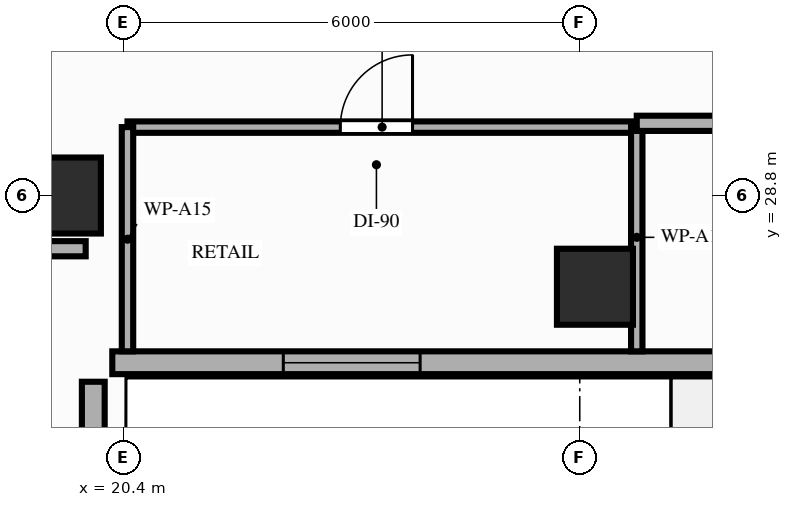
"""IFC4 building model, lengths in metres.
Left out: names, types, materials, properties, quantities, classifications, styles, units other than length and angle.
Written with IfcOpenShell. Run it as: python <this file> out.ifc"""

import sys

from ifc_helpers import new_model, si_unit, direction, frame, frame_2d, origin, origin_2d, place, context, subcontext, project, spatial, rectangle, extrude, element, fill, save


model = new_model("IFC4")
c1 = context("Model", 3, precision=1e-05, world=origin(), true_north=direction((0.0, 1.0)))
c2 = subcontext(c1, "Body", "Model", "MODEL_VIEW")
j1 = project(units=[si_unit("LENGTHUNIT", "METRE"), si_unit("PLANEANGLEUNIT", "RADIAN")], contexts=[c1])
p1 = place(None, origin())
s1 = spatial("IfcSite", under=j1, at=p1, CompositionType="ELEMENT")
p2 = place(p1, origin())
s2 = spatial("IfcBuilding", under=s1, at=p2, CompositionType="ELEMENT")
p3 = place(p2, frame((0.0, 0.0, 117.0)))
s3 = spatial("IfcBuildingStorey", under=s2, at=p3, CompositionType="ELEMENT", Elevation=117.0)
for number, where, z_axis, x_axis in (
    (1, (19.6, 28.8, 0.0), (0.0, 0.0, 1.0), (1.0, 0.0, 0.0)),
    (2, (26.6, 27.6, 0.0), (0.0, 0.0, 1.0), (1.0, 0.0, 0.0)),
):
    element("IfcColumn", number, at=place(p3, frame(where, z_axis=z_axis, x_axis=x_axis)), inside=s3, PredefinedType="COLUMN", context=c2, shape_type="SweptSolid", body=[
        extrude(rectangle(XDim=1.0, YDim=1.0, at=origin_2d()), origin(), (0.0, 0.0, 1.0), 3.2),
    ])
p4 = place(p3, frame((20.0, 8.8, 0.0), z_axis=(0.0, 0.0, 1.0), x_axis=(0.0, 1.0, 0.0)))
e3 = element("IfcWall", 3, at=p4, inside=s3, PredefinedType="STANDARD", context=c2, shape_type="SweptSolid", body=[
    extrude(rectangle(XDim=17.55, YDim=0.3, at=frame_2d((8.775, 0.0))), origin(), (0.0, 0.0, 1.0), 2.41),
])
p5 = place(p4, frame((12.04, 0.0, 0.85)))
e4 = element("IfcOpeningElement", 4, at=p5, cuts=e3, PredefinedType="OPENING", context=c2, shape_type="SweptSolid", body=[
    extrude(rectangle(XDim=1.8, YDim=1.31, at=frame_2d((0.9, 0.655))), frame((0.0, 0.16, 0.0), z_axis=(0.0, -1.0, 0.0), x_axis=(1.0, 0.0, 0.0)), (0.0, 0.0, 1.0), 0.32),
])
p6 = place(p4, frame((5.6, 0.0, 0.85)))
e5 = element("IfcOpeningElement", 5, at=p6, cuts=e3, PredefinedType="OPENING", context=c2, shape_type="SweptSolid", body=[
    extrude(rectangle(XDim=1.8, YDim=1.31, at=frame_2d((0.9, 0.655))), frame((0.0, 0.16, 0.0), z_axis=(0.0, -1.0, 0.0), x_axis=(1.0, 0.0, 0.0)), (0.0, 0.0, 1.0), 0.32),
])
p7 = place(p3, frame((20.25, 26.6, 0.0), z_axis=(0.0, 0.0, 1.0), x_axis=(1.0, 0.0, 0.0)))
e6 = element("IfcWall", 6, at=p7, inside=s3, PredefinedType="STANDARD", context=c2, shape_type="SweptSolid", body=[
    extrude(rectangle(XDim=26.15, YDim=0.3, at=frame_2d((13.075, 0.0))), origin(), (0.0, 0.0, 1.0), 2.7),
])
p8 = place(p7, frame((8.0, 0.0, 0.0)))
e7 = element("IfcOpeningElement", 7, at=p8, cuts=e6, PredefinedType="OPENING", context=c2, shape_type="SweptSolid", body=[
    extrude(rectangle(XDim=1.3, YDim=2.08, at=frame_2d((0.65, 1.04))), frame((0.0, 0.16, 0.0), z_axis=(0.0, -1.0, 0.0), x_axis=(1.0, 0.0, 0.0)), (0.0, 0.0, 1.0), 0.32),
])
p9 = place(p7, frame((22.5, 0.0, 0.0)))
e8 = element("IfcOpeningElement", 8, at=p9, cuts=e6, PredefinedType="OPENING", context=c2, shape_type="SweptSolid", body=[
    extrude(rectangle(XDim=1.3, YDim=2.08, at=frame_2d((0.65, 1.04))), frame((0.0, 0.16, 0.0), z_axis=(0.0, -1.0, 0.0), x_axis=(1.0, 0.0, 0.0)), (0.0, 0.0, 1.0), 0.32),
])
p10 = place(p7, frame((2.25, 0.0, 0.85)))
e9 = element("IfcOpeningElement", 9, at=p10, cuts=e6, PredefinedType="OPENING", context=c2, shape_type="SweptSolid", body=[
    extrude(rectangle(XDim=1.8, YDim=1.6, at=frame_2d((0.9, 0.8))), frame((0.0, 0.16, 0.0), z_axis=(0.0, -1.0, 0.0), x_axis=(1.0, 0.0, 0.0)), (0.0, 0.0, 1.0), 0.32),
])
p11 = place(p3, frame((11.01, 28.1, 0.0), z_axis=(0.0, 0.0, 1.0), x_axis=(1.0, 0.0, 0.0)))
e10 = element("IfcWall", 10, at=p11, inside=s3, PredefinedType="PARTITIONING", context=c2, shape_type="SweptSolid", body=[
    extrude(rectangle(XDim=8.89, YDim=0.2, at=frame_2d((4.445, 0.0))), origin(), (0.0, 0.0, 1.0), 2.41),
])
p12 = place(p3, frame((20.45, 29.7, 0.0), z_axis=(0.0, 0.0, 1.0), x_axis=(1.0, 0.0, 0.0)))
e11 = element("IfcWall", 11, at=p12, inside=s3, PredefinedType="PARTITIONING", context=c2, shape_type="SweptSolid", body=[
    extrude(rectangle(XDim=6.7, YDim=0.15, at=frame_2d((3.35, 0.0))), origin(), (0.0, 0.0, 1.0), 3.02),
])
p13 = place(p12, frame((2.8, 0.0, 0.0)))
e12 = element("IfcOpeningElement", 12, at=p13, cuts=e11, PredefinedType="OPENING", context=c2, shape_type="SweptSolid", body=[
    extrude(rectangle(XDim=0.95, YDim=2.15, at=frame_2d((0.475, 1.075))), frame((0.0, 0.085, 0.0), z_axis=(0.0, -1.0, 0.0), x_axis=(1.0, 0.0, 0.0)), (0.0, 0.0, 1.0), 0.17),
])
p14 = place(p3, frame((20.45, 26.75, 0.0), z_axis=(0.0, 0.0, 1.0), x_axis=(0.0, 1.0, 0.0)))
e13 = element("IfcWall", 13, at=p14, inside=s3, PredefinedType="PARTITIONING", context=c2, shape_type="SweptSolid", body=[
    extrude(rectangle(XDim=2.95, YDim=0.15, at=frame_2d((1.475, 0.0))), origin(), (0.0, 0.0, 1.0), 2.41),
])
p15 = place(p3, frame((27.15, 26.75, 0.0), z_axis=(0.0, 0.0, 1.0), x_axis=(0.0, 1.0, 0.0)))
e14 = element("IfcWall", 14, at=p15, inside=s3, PredefinedType="PARTITIONING", context=c2, shape_type="SweptSolid", body=[
    extrude(rectangle(XDim=3.0, YDim=0.15, at=frame_2d((1.5, 0.0))), origin(), (0.0, 0.0, 1.0), 2.41),
])
p16 = place(p3, frame((27.15, 29.75, 0.0), z_axis=(0.0, 0.0, 1.0), x_axis=(1.0, 0.0, 0.0)))
e15 = element("IfcWall", 15, at=p16, inside=s3, PredefinedType="PARTITIONING", context=c2, shape_type="SweptSolid", body=[
    extrude(rectangle(XDim=13.15, YDim=0.2, at=frame_2d((6.575, 0.0))), origin(), (0.0, 0.0, 1.0), 2.41),
])
p17 = place(p16, frame((3.66, 0.0, 0.0)))
e16 = element("IfcOpeningElement", 16, at=p17, cuts=e15, PredefinedType="OPENING", context=c2, shape_type="SweptSolid", body=[
    extrude(rectangle(XDim=0.95, YDim=2.15, at=frame_2d((0.475, 1.075))), frame((0.0, 0.11, 0.0), z_axis=(0.0, -1.0, 0.0), x_axis=(1.0, 0.0, 0.0)), (0.0, 0.0, 1.0), 0.22),
])
p18 = place(p16, frame((10.23, 0.0, 0.0)))
e17 = element("IfcOpeningElement", 17, at=p18, cuts=e15, PredefinedType="OPENING", context=c2, shape_type="SweptSolid", body=[
    extrude(rectangle(XDim=0.95, YDim=2.15, at=frame_2d((0.475, 1.075))), frame((0.0, 0.11, 0.0), z_axis=(0.0, -1.0, 0.0), x_axis=(1.0, 0.0, 0.0)), (0.0, 0.0, 1.0), 0.22),
])
p19 = place(p10, origin())
e18 = element("IfcWindow", 18, at=p19, inside=s3, PartitioningType="SINGLE_PANEL", PredefinedType="WINDOW", context=c2, shape_type="SweptSolid", body=[
    extrude(rectangle(XDim=1.8, YDim=1.6, at=frame_2d((0.9, 0.8))), frame((0.0, 0.03, 0.0), z_axis=(0.0, -1.0, 0.0), x_axis=(1.0, 0.0, 0.0)), (0.0, 0.0, 1.0), 0.06),
])
fill(e9, e18)
p20 = place(p13, origin())
e19 = element("IfcDoor", 19, at=p20, inside=s3, OperationType="SINGLE_SWING_RIGHT", PredefinedType="DOOR", context=c2, shape_type="SweptSolid", body=[
    extrude(rectangle(XDim=0.95, YDim=2.15, at=frame_2d((0.475, 1.075))), frame((0.0, 0.025, 0.0), z_axis=(0.0, -1.0, 0.0), x_axis=(1.0, 0.0, 0.0)), (0.0, 0.0, 1.0), 0.05),
])
fill(e12, e19)
save(model, sys.argv[1])
